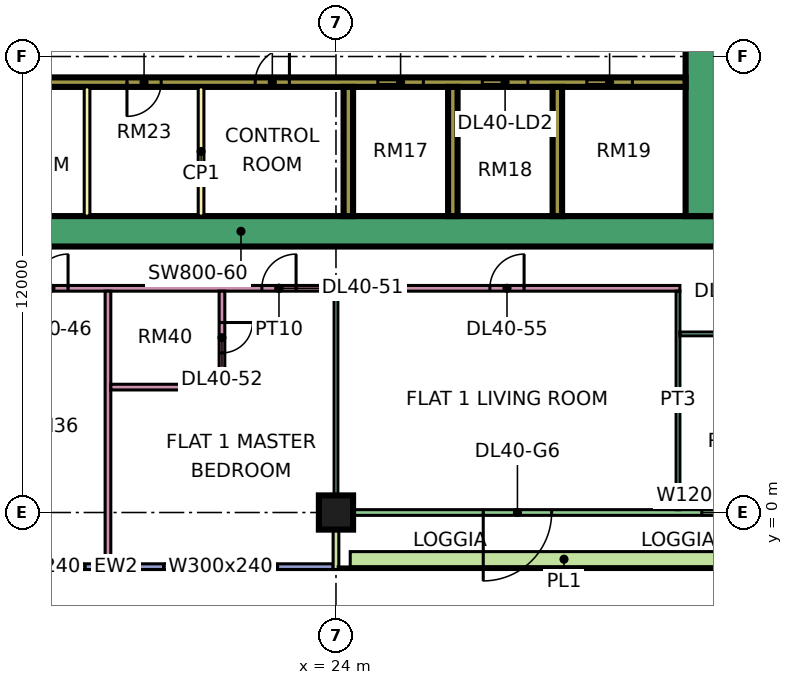
"""IFC4 building model, lengths in metres.
Left out: names, types, materials, properties, quantities, classifications, styles, units other than length and angle.
Written with IfcOpenShell. Run it as: python <this file> out.ifc"""

import sys

from ifc_helpers import new_model, si_unit, direction, frame, frame_2d, origin, origin_2d, place, context, subcontext, project, spatial, rectangle, extrude, element, fill, save


model = new_model("IFC4")
c1 = context("Model", 3, precision=1e-05, world=origin(), true_north=direction((0.0, 1.0)))
c2 = subcontext(c1, "Body", "Model", "MODEL_VIEW")
j1 = project(units=[si_unit("LENGTHUNIT", "METRE"), si_unit("PLANEANGLEUNIT", "RADIAN")], contexts=[c1])
p1 = place(None, origin())
s1 = spatial("IfcSite", under=j1, at=p1, CompositionType="ELEMENT")
p2 = place(p1, origin())
s2 = spatial("IfcBuilding", under=s1, at=p2, CompositionType="ELEMENT")
p3 = place(p2, frame((0.0, 0.0, 176.15)))
s3 = spatial("IfcBuildingStorey", under=s2, at=p3, CompositionType="ELEMENT", Elevation=176.15)
p4 = place(p3, frame((24.0, 0.0, 0.0), z_axis=(0.0, 0.0, 1.0), x_axis=(1.0, 0.0, 0.0)))
e1 = element("IfcColumn", 1, at=p4, inside=s3, PredefinedType="COLUMN", context=c2, shape_type="SweptSolid", body=[
    extrude(rectangle(XDim=0.9, YDim=0.9, at=origin_2d()), origin(), (0.0, 0.0, 1.0), 3.75),
])
p5 = place(p3, frame((9.0, 7.4, 0.0), z_axis=(0.0, 0.0, 1.0), x_axis=(1.0, 0.0, 0.0)))
e2 = element("IfcWall", 2, at=p5, inside=s3, PredefinedType="SHEAR", context=c2, shape_type="SweptSolid", body=[
    extrude(rectangle(XDim=25.0, YDim=0.8, at=frame_2d((12.5, 0.0))), origin(), (0.0, 0.0, 1.0), 3.75),
])
p6 = place(p3, frame((33.6, 7.8, 0.0), z_axis=(0.0, 0.0, 1.0), x_axis=(0.0, 1.0, 0.0)))
e3 = element("IfcWall", 3, at=p6, inside=s3, PredefinedType="SHEAR", context=c2, shape_type="SweptSolid", body=[
    extrude(rectangle(XDim=11.4, YDim=0.8, at=frame_2d((5.7, 0.0))), origin(), (0.0, 0.0, 1.0), 3.75),
])
p7 = place(p6, frame((5.4, 0.0, 0.0)))
e4 = element("IfcOpeningElement", 4, at=p7, cuts=e3, PredefinedType="OPENING", context=c2, shape_type="SweptSolid", body=[
    extrude(rectangle(XDim=1.8, YDim=2.4, at=frame_2d((0.9, 1.2))), frame((0.0, 0.41, 0.0), z_axis=(0.0, -1.0, 0.0), x_axis=(1.0, 0.0, 0.0)), (0.0, 0.0, 1.0), 0.82),
])
p8 = place(p3, frame((13.45, 11.325, 0.0), z_axis=(0.0, 0.0, 1.0), x_axis=(1.0, 0.0, 0.0)))
e5 = element("IfcWall", 5, at=p8, inside=s3, PredefinedType="SHEAR", context=c2, shape_type="SweptSolid", body=[
    extrude(rectangle(XDim=19.75, YDim=0.25, at=frame_2d((9.875, 0.0))), origin(), (0.0, 0.0, 1.0), 3.75),
])
p9 = place(p8, frame((11.65, 0.0, 0.0)))
e6 = element("IfcOpeningElement", 6, at=p9, cuts=e5, PredefinedType="OPENING", context=c2, shape_type="SweptSolid", body=[
    extrude(rectangle(XDim=1.2, YDim=2.2, at=frame_2d((0.6, 1.1))), frame((0.0, 0.135, 0.0), z_axis=(0.0, -1.0, 0.0), x_axis=(1.0, 0.0, 0.0)), (0.0, 0.0, 1.0), 0.27),
])
p10 = place(p8, frame((14.4, 0.0, 0.0)))
e7 = element("IfcOpeningElement", 7, at=p10, cuts=e5, PredefinedType="OPENING", context=c2, shape_type="SweptSolid", body=[
    extrude(rectangle(XDim=1.2, YDim=2.2, at=frame_2d((0.6, 1.1))), frame((0.0, 0.135, 0.0), z_axis=(0.0, -1.0, 0.0), x_axis=(1.0, 0.0, 0.0)), (0.0, 0.0, 1.0), 0.27),
])
p11 = place(p8, frame((17.15, 0.0, 0.0)))
e8 = element("IfcOpeningElement", 8, at=p11, cuts=e5, PredefinedType="OPENING", context=c2, shape_type="SweptSolid", body=[
    extrude(rectangle(XDim=1.2, YDim=2.2, at=frame_2d((0.6, 1.1))), frame((0.0, 0.135, 0.0), z_axis=(0.0, -1.0, 0.0), x_axis=(1.0, 0.0, 0.0)), (0.0, 0.0, 1.0), 0.27),
])
p12 = place(p8, frame((1.55, 0.0, 0.0)))
e9 = element("IfcOpeningElement", 9, at=p12, cuts=e5, PredefinedType="OPENING", context=c2, shape_type="SweptSolid", body=[
    extrude(rectangle(XDim=0.9, YDim=2.1, at=frame_2d((0.45, 1.05))), frame((0.0, 0.135, 0.0), z_axis=(0.0, -1.0, 0.0), x_axis=(1.0, 0.0, 0.0)), (0.0, 0.0, 1.0), 0.27),
])
p13 = place(p8, frame((5.05, 0.0, 0.0)))
e10 = element("IfcOpeningElement", 10, at=p13, cuts=e5, PredefinedType="OPENING", context=c2, shape_type="SweptSolid", body=[
    extrude(rectangle(XDim=0.9, YDim=2.1, at=frame_2d((0.45, 1.05))), frame((0.0, 0.135, 0.0), z_axis=(0.0, -1.0, 0.0), x_axis=(1.0, 0.0, 0.0)), (0.0, 0.0, 1.0), 0.27),
])
p14 = place(p8, frame((8.425, 0.0, 0.0)))
e11 = element("IfcOpeningElement", 11, at=p14, cuts=e5, PredefinedType="OPENING", context=c2, shape_type="SweptSolid", body=[
    extrude(rectangle(XDim=0.9, YDim=2.1, at=frame_2d((0.45, 1.05))), frame((0.0, 0.135, 0.0), z_axis=(0.0, -1.0, 0.0), x_axis=(1.0, 0.0, 0.0)), (0.0, 0.0, 1.0), 0.27),
])
for number, where, z_axis, x_axis in (
    (12, (24.325, 7.8, 0.0), (0.0, 0.0, 1.0), (0.0, 1.0, 0.0)),
    (13, (27.075, 7.8, 0.0), (0.0, 0.0, 1.0), (0.0, 1.0, 0.0)),
    (14, (29.825, 7.8, 0.0), (0.0, 0.0, 1.0), (0.0, 1.0, 0.0)),
):
    element("IfcWall", number, at=place(p3, frame(where, z_axis=z_axis, x_axis=x_axis)), inside=s3, PredefinedType="SHEAR", context=c2, shape_type="SweptSolid", body=[
        extrude(rectangle(XDim=3.4, YDim=0.25, at=frame_2d((1.7, 0.0))), origin(), (0.0, 0.0, 1.0), 3.75),
    ])
p15 = place(p3, frame((12.5, -1.425, 0.0), z_axis=(0.0, 0.0, 1.0), x_axis=(1.0, 0.0, 0.0)))
e15 = element("IfcWall", 15, at=p15, inside=s3, PredefinedType="SOLIDWALL", context=c2, shape_type="SweptSolid", body=[
    extrude(rectangle(XDim=11.425, YDim=0.15, at=frame_2d((5.712, 0.0))), origin(), (0.0, 0.0, 1.0), 3.35),
])
p16 = place(p15, frame((0.35, 0.0, 0.45)))
e16 = element("IfcOpeningElement", 16, at=p16, cuts=e15, PredefinedType="OPENING", context=c2, shape_type="SweptSolid", body=[
    extrude(rectangle(XDim=1.8, YDim=2.4, at=frame_2d((0.9, 1.2))), frame((0.0, 0.085, 0.0), z_axis=(0.0, -1.0, 0.0), x_axis=(1.0, 0.0, 0.0)), (0.0, 0.0, 1.0), 0.17),
])
p17 = place(p15, frame((3.1, 0.0, 0.45)))
e17 = element("IfcOpeningElement", 17, at=p17, cuts=e15, PredefinedType="OPENING", context=c2, shape_type="SweptSolid", body=[
    extrude(rectangle(XDim=1.8, YDim=2.4, at=frame_2d((0.9, 1.2))), frame((0.0, 0.085, 0.0), z_axis=(0.0, -1.0, 0.0), x_axis=(1.0, 0.0, 0.0)), (0.0, 0.0, 1.0), 0.17),
])
p18 = place(p15, frame((6.962, 0.0, 0.45)))
e18 = element("IfcOpeningElement", 18, at=p18, cuts=e15, PredefinedType="OPENING", context=c2, shape_type="SweptSolid", body=[
    extrude(rectangle(XDim=3.0, YDim=2.4, at=frame_2d((1.5, 1.2))), frame((0.0, 0.085, 0.0), z_axis=(0.0, -1.0, 0.0), x_axis=(1.0, 0.0, 0.0)), (0.0, 0.0, 1.0), 0.17),
])
p19 = place(p3, frame((24.075, 0.0, 0.0), z_axis=(0.0, 0.0, 1.0), x_axis=(1.0, 0.0, 0.0)))
e19 = element("IfcWall", 19, at=p19, inside=s3, PredefinedType="SOLIDWALL", context=c2, shape_type="SweptSolid", body=[
    extrude(rectangle(XDim=11.85, YDim=0.15, at=frame_2d((5.925, 0.0))), origin(), (0.0, 0.0, 1.0), 3.35),
])
p20 = place(p19, frame((3.8, 0.0, 0.0)))
e20 = element("IfcOpeningElement", 20, at=p20, cuts=e19, PredefinedType="OPENING", context=c2, shape_type="SweptSolid", body=[
    extrude(rectangle(XDim=1.8, YDim=2.4, at=frame_2d((0.9, 1.2))), frame((0.0, 0.085, 0.0), z_axis=(0.0, -1.0, 0.0), x_axis=(1.0, 0.0, 0.0)), (0.0, 0.0, 1.0), 0.17),
])
p21 = place(p19, frame((9.55, 0.0, 0.45)))
e21 = element("IfcOpeningElement", 21, at=p21, cuts=e19, PredefinedType="OPENING", context=c2, shape_type="SweptSolid", body=[
    extrude(rectangle(XDim=1.2, YDim=2.4, at=frame_2d((0.6, 1.2))), frame((0.0, 0.085, 0.0), z_axis=(0.0, -1.0, 0.0), x_axis=(1.0, 0.0, 0.0)), (0.0, 0.0, 1.0), 0.17),
])
p22 = place(p3, frame((24.0, -1.5, 0.0), z_axis=(0.0, 0.0, 1.0), x_axis=(0.0, 1.0, 0.0)))
e22 = element("IfcWall", 22, at=p22, inside=s3, PredefinedType="SOLIDWALL", context=c2, shape_type="SweptSolid", body=[
    extrude(rectangle(XDim=1.5, YDim=0.15, at=frame_2d((0.75, 0.0))), origin(), (0.0, 0.0, 1.0), 3.35),
])
p23 = place(p3, frame((24.375, -1.229, 0.0), z_axis=(0.0, 0.0, 1.0), x_axis=(1.0, 0.0, 0.0)))
e23 = element("IfcWall", 23, at=p23, inside=s3, PredefinedType="SOLIDWALL", context=c2, shape_type="SweptSolid", body=[
    extrude(rectangle(XDim=11.25, YDim=0.4, at=frame_2d((5.625, 0.0))), origin(), (0.0, 0.0, 1.0), 0.7),
])
for number, where, z_axis, x_axis in (
    (24, (17.45, 7.8, 0.0), (0.0, 0.0, 1.0), (0.0, 1.0, 0.0)),
    (25, (20.45, 7.8, 0.0), (0.0, 0.0, 1.0), (0.0, 1.0, 0.0)),
):
    element("IfcWall", number, at=place(p3, frame(where, z_axis=z_axis, x_axis=x_axis)), inside=s3, PredefinedType="PARTITIONING", context=c2, shape_type="SweptSolid", body=[
        extrude(rectangle(XDim=3.4, YDim=0.15, at=frame_2d((1.7, 0.0))), origin(), (0.0, 0.0, 1.0), 3.35),
    ])
p24 = place(p3, frame((11.95, 5.9, 0.0), z_axis=(0.0, 0.0, 1.0), x_axis=(1.0, 0.0, 0.0)))
e26 = element("IfcWall", 26, at=p24, inside=s3, PredefinedType="PARTITIONING", context=c2, shape_type="SweptSolid", body=[
    extrude(rectangle(XDim=21.1, YDim=0.15, at=frame_2d((10.55, 0.0))), origin(), (0.0, 0.0, 1.0), 3.35),
])
p25 = place(p24, frame((1.1, 0.0, 0.0)))
e27 = element("IfcOpeningElement", 27, at=p25, cuts=e26, PredefinedType="OPENING", context=c2, shape_type="SweptSolid", body=[
    extrude(rectangle(XDim=0.9, YDim=2.1, at=frame_2d((0.45, 1.05))), frame((0.0, 0.085, 0.0), z_axis=(0.0, -1.0, 0.0), x_axis=(1.0, 0.0, 0.0)), (0.0, 0.0, 1.0), 0.17),
])
p26 = place(p24, frame((4.1, 0.0, 0.0)))
e28 = element("IfcOpeningElement", 28, at=p26, cuts=e26, PredefinedType="OPENING", context=c2, shape_type="SweptSolid", body=[
    extrude(rectangle(XDim=0.9, YDim=2.1, at=frame_2d((0.45, 1.05))), frame((0.0, 0.085, 0.0), z_axis=(0.0, -1.0, 0.0), x_axis=(1.0, 0.0, 0.0)), (0.0, 0.0, 1.0), 0.17),
])
p27 = place(p24, frame((10.1, 0.0, 0.0)))
e29 = element("IfcOpeningElement", 29, at=p27, cuts=e26, PredefinedType="OPENING", context=c2, shape_type="SweptSolid", body=[
    extrude(rectangle(XDim=0.9, YDim=2.1, at=frame_2d((0.45, 1.05))), frame((0.0, 0.085, 0.0), z_axis=(0.0, -1.0, 0.0), x_axis=(1.0, 0.0, 0.0)), (0.0, 0.0, 1.0), 0.17),
])
p28 = place(p24, frame((16.1, 0.0, 0.0)))
e30 = element("IfcOpeningElement", 30, at=p28, cuts=e26, PredefinedType="OPENING", context=c2, shape_type="SweptSolid", body=[
    extrude(rectangle(XDim=0.9, YDim=2.1, at=frame_2d((0.45, 1.05))), frame((0.0, 0.085, 0.0), z_axis=(0.0, -1.0, 0.0), x_axis=(1.0, 0.0, 0.0)), (0.0, 0.0, 1.0), 0.17),
])
p29 = place(p3, frame((18.0, -1.351, 0.0), z_axis=(0.0, 0.0, 1.0), x_axis=(0.0, 1.0, 0.0)))
e31 = element("IfcWall", 31, at=p29, inside=s3, PredefinedType="PARTITIONING", context=c2, shape_type="SweptSolid", body=[
    extrude(rectangle(XDim=7.176, YDim=0.15, at=frame_2d((3.588, 0.0))), origin(), (0.0, 0.0, 1.0), 3.35),
])
p30 = place(p3, frame((18.075, 3.3, 0.0), z_axis=(0.0, 0.0, 1.0), x_axis=(1.0, 0.0, 0.0)))
e32 = element("IfcWall", 32, at=p30, inside=s3, PredefinedType="PARTITIONING", context=c2, shape_type="SweptSolid", body=[
    extrude(rectangle(XDim=3.0, YDim=0.15, at=frame_2d((1.5, 0.0))), origin(), (0.0, 0.0, 1.0), 3.35),
])
p31 = place(p3, frame((21.0, 3.375, 0.0), z_axis=(0.0, 0.0, 1.0), x_axis=(0.0, 1.0, 0.0)))
e33 = element("IfcWall", 33, at=p31, inside=s3, PredefinedType="PARTITIONING", context=c2, shape_type="SweptSolid", body=[
    extrude(rectangle(XDim=2.45, YDim=0.15, at=frame_2d((1.225, 0.0))), origin(), (0.0, 0.0, 1.0), 3.35),
])
p32 = place(p31, frame((0.825, 0.0, 0.0)))
e34 = element("IfcOpeningElement", 34, at=p32, cuts=e33, PredefinedType="OPENING", context=c2, shape_type="SweptSolid", body=[
    extrude(rectangle(XDim=0.8, YDim=2.1, at=frame_2d((0.4, 1.05))), frame((0.0, 0.085, 0.0), z_axis=(0.0, -1.0, 0.0), x_axis=(1.0, 0.0, 0.0)), (0.0, 0.0, 1.0), 0.17),
])
p33 = place(p3, frame((24.0, 0.0, 0.0), z_axis=(0.0, 0.0, 1.0), x_axis=(0.0, 1.0, 0.0)))
e35 = element("IfcWall", 35, at=p33, inside=s3, PredefinedType="PARTITIONING", context=c2, shape_type="SweptSolid", body=[
    extrude(rectangle(XDim=5.825, YDim=0.1, at=frame_2d((2.913, 0.0))), origin(), (0.0, 0.0, 1.0), 3.35),
])
p34 = place(p3, frame((33.0, 0.074, 0.0), z_axis=(0.0, 0.0, 1.0), x_axis=(0.0, 1.0, 0.0)))
e36 = element("IfcWall", 36, at=p34, inside=s3, PredefinedType="PARTITIONING", context=c2, shape_type="SweptSolid", body=[
    extrude(rectangle(XDim=5.751, YDim=0.1, at=frame_2d((2.875, 0.0))), origin(), (0.0, 0.0, 1.0), 3.35),
])
p35 = place(p3, frame((33.05, 4.7, 0.0), z_axis=(0.0, 0.0, 1.0), x_axis=(1.0, 0.0, 0.0)))
e37 = element("IfcWall", 37, at=p35, inside=s3, PredefinedType="PARTITIONING", context=c2, shape_type="SweptSolid", body=[
    extrude(rectangle(XDim=14.85, YDim=0.1, at=frame_2d((7.425, 0.0))), origin(), (0.0, 0.0, 1.0), 3.35),
])
p36 = place(p35, frame((1.0, 0.0, 0.0)))
e38 = element("IfcOpeningElement", 38, at=p36, cuts=e37, PredefinedType="OPENING", context=c2, shape_type="SweptSolid", body=[
    extrude(rectangle(XDim=0.9, YDim=2.1, at=frame_2d((0.45, 1.05))), frame((0.0, 0.06, 0.0), z_axis=(0.0, -1.0, 0.0), x_axis=(1.0, 0.0, 0.0)), (0.0, 0.0, 1.0), 0.12),
])
p37 = place(p35, frame((4.0, 0.0, 0.0)))
e39 = element("IfcOpeningElement", 39, at=p37, cuts=e37, PredefinedType="OPENING", context=c2, shape_type="SweptSolid", body=[
    extrude(rectangle(XDim=0.9, YDim=2.1, at=frame_2d((0.45, 1.05))), frame((0.0, 0.06, 0.0), z_axis=(0.0, -1.0, 0.0), x_axis=(1.0, 0.0, 0.0)), (0.0, 0.0, 1.0), 0.12),
])
p38 = place(p35, frame((10.0, 0.0, 0.0)))
e40 = element("IfcOpeningElement", 40, at=p38, cuts=e37, PredefinedType="OPENING", context=c2, shape_type="SweptSolid", body=[
    extrude(rectangle(XDim=0.9, YDim=2.1, at=frame_2d((0.45, 1.05))), frame((0.0, 0.06, 0.0), z_axis=(0.0, -1.0, 0.0), x_axis=(1.0, 0.0, 0.0)), (0.0, 0.0, 1.0), 0.12),
])
p39 = place(p17, origin())
e41 = element("IfcWindow", 41, at=p39, inside=s3, PartitioningType="SINGLE_PANEL", PredefinedType="WINDOW", context=c2, shape_type="SweptSolid", body=[
    extrude(rectangle(XDim=1.8, YDim=2.4, at=frame_2d((0.9, 1.2))), frame((0.0, 0.03, 0.0), z_axis=(0.0, -1.0, 0.0), x_axis=(1.0, 0.0, 0.0)), (0.0, 0.0, 1.0), 0.06),
])
fill(e17, e41)
p40 = place(p18, origin())
e42 = element("IfcWindow", 42, at=p40, inside=s3, PartitioningType="SINGLE_PANEL", PredefinedType="WINDOW", context=c2, shape_type="SweptSolid", body=[
    extrude(rectangle(XDim=3.0, YDim=2.4, at=frame_2d((1.5, 1.2))), frame((0.0, 0.03, 0.0), z_axis=(0.0, -1.0, 0.0), x_axis=(1.0, 0.0, 0.0)), (0.0, 0.0, 1.0), 0.06),
])
fill(e18, e42)
p41 = place(p20, frame((1.8, 0.0, 0.0), z_axis=(0.0, 0.0, 1.0), x_axis=(-1.0, 0.0, 0.0)))
e43 = element("IfcDoor", 43, at=p41, inside=s3, OperationType="DOUBLE_DOOR_SINGLE_SWING", PredefinedType="DOOR", context=c2, shape_type="SweptSolid", body=[
    extrude(rectangle(XDim=1.8, YDim=2.4, at=frame_2d((0.9, 1.2))), frame((0.0, 0.025, 0.0), z_axis=(0.0, -1.0, 0.0), x_axis=(1.0, 0.0, 0.0)), (0.0, 0.0, 1.0), 0.05),
])
fill(e20, e43)
p42 = place(p21, origin())
e44 = element("IfcWindow", 44, at=p42, inside=s3, PartitioningType="SINGLE_PANEL", PredefinedType="WINDOW", context=c2, shape_type="SweptSolid", body=[
    extrude(rectangle(XDim=1.2, YDim=2.4, at=frame_2d((0.6, 1.2))), frame((0.0, 0.03, 0.0), z_axis=(0.0, -1.0, 0.0), x_axis=(1.0, 0.0, 0.0)), (0.0, 0.0, 1.0), 0.06),
])
fill(e21, e44)
p43 = place(p9, origin())
e45 = element("IfcDoor", 45, at=p43, inside=s3, OperationType="DOUBLE_DOOR_SLIDING", PredefinedType="DOOR", context=c2, shape_type="SweptSolid", body=[
    extrude(rectangle(XDim=1.2, YDim=2.2, at=frame_2d((0.6, 1.1))), frame((0.0, 0.025, 0.0), z_axis=(0.0, -1.0, 0.0), x_axis=(1.0, 0.0, 0.0)), (0.0, 0.0, 1.0), 0.05),
])
fill(e6, e45)
p44 = place(p10, origin())
e46 = element("IfcDoor", 46, at=p44, inside=s3, OperationType="DOUBLE_DOOR_SLIDING", PredefinedType="DOOR", context=c2, shape_type="SweptSolid", body=[
    extrude(rectangle(XDim=1.2, YDim=2.2, at=frame_2d((0.6, 1.1))), frame((0.0, 0.025, 0.0), z_axis=(0.0, -1.0, 0.0), x_axis=(1.0, 0.0, 0.0)), (0.0, 0.0, 1.0), 0.05),
])
fill(e7, e46)
p45 = place(p11, origin())
e47 = element("IfcDoor", 47, at=p45, inside=s3, OperationType="DOUBLE_DOOR_SLIDING", PredefinedType="DOOR", context=c2, shape_type="SweptSolid", body=[
    extrude(rectangle(XDim=1.2, YDim=2.2, at=frame_2d((0.6, 1.1))), frame((0.0, 0.025, 0.0), z_axis=(0.0, -1.0, 0.0), x_axis=(1.0, 0.0, 0.0)), (0.0, 0.0, 1.0), 0.05),
])
fill(e8, e47)
p46 = place(p13, frame((0.9, 0.0, 0.0), z_axis=(0.0, 0.0, 1.0), x_axis=(-1.0, 0.0, 0.0)))
e48 = element("IfcDoor", 48, at=p46, inside=s3, OperationType="SINGLE_SWING_LEFT", PredefinedType="DOOR", context=c2, shape_type="SweptSolid", body=[
    extrude(rectangle(XDim=0.9, YDim=2.1, at=frame_2d((0.45, 1.05))), frame((0.0, 0.025, 0.0), z_axis=(0.0, -1.0, 0.0), x_axis=(1.0, 0.0, 0.0)), (0.0, 0.0, 1.0), 0.05),
])
fill(e10, e48)
p47 = place(p14, frame((0.9, 0.0, 0.0), z_axis=(0.0, 0.0, 1.0), x_axis=(-1.0, 0.0, 0.0)))
e49 = element("IfcDoor", 49, at=p47, inside=s3, OperationType="SINGLE_SWING_RIGHT", PredefinedType="DOOR", context=c2, shape_type="SweptSolid", body=[
    extrude(rectangle(XDim=0.9, YDim=2.1, at=frame_2d((0.45, 1.05))), frame((0.0, 0.025, 0.0), z_axis=(0.0, -1.0, 0.0), x_axis=(1.0, 0.0, 0.0)), (0.0, 0.0, 1.0), 0.05),
])
fill(e11, e49)
p48 = place(p26, frame((0.9, 0.0, 0.0), z_axis=(0.0, 0.0, 1.0), x_axis=(-1.0, 0.0, 0.0)))
e50 = element("IfcDoor", 50, at=p48, inside=s3, OperationType="SINGLE_SWING_RIGHT", PredefinedType="DOOR", context=c2, shape_type="SweptSolid", body=[
    extrude(rectangle(XDim=0.9, YDim=2.1, at=frame_2d((0.45, 1.05))), frame((0.0, 0.025, 0.0), z_axis=(0.0, -1.0, 0.0), x_axis=(1.0, 0.0, 0.0)), (0.0, 0.0, 1.0), 0.05),
])
fill(e28, e50)
p49 = place(p27, frame((0.9, 0.0, 0.0), z_axis=(0.0, 0.0, 1.0), x_axis=(-1.0, 0.0, 0.0)))
e51 = element("IfcDoor", 51, at=p49, inside=s3, OperationType="SINGLE_SWING_RIGHT", PredefinedType="DOOR", context=c2, shape_type="SweptSolid", body=[
    extrude(rectangle(XDim=0.9, YDim=2.1, at=frame_2d((0.45, 1.05))), frame((0.0, 0.025, 0.0), z_axis=(0.0, -1.0, 0.0), x_axis=(1.0, 0.0, 0.0)), (0.0, 0.0, 1.0), 0.05),
])
fill(e29, e51)
p50 = place(p32, origin())
e52 = element("IfcDoor", 52, at=p50, inside=s3, OperationType="SINGLE_SWING_RIGHT", PredefinedType="DOOR", context=c2, shape_type="SweptSolid", body=[
    extrude(rectangle(XDim=0.8, YDim=2.1, at=frame_2d((0.4, 1.05))), frame((0.0, 0.025, 0.0), z_axis=(0.0, -1.0, 0.0), x_axis=(1.0, 0.0, 0.0)), (0.0, 0.0, 1.0), 0.05),
])
fill(e34, e52)
p51 = place(p28, frame((0.9, 0.0, 0.0), z_axis=(0.0, 0.0, 1.0), x_axis=(-1.0, 0.0, 0.0)))
e53 = element("IfcDoor", 53, at=p51, inside=s3, OperationType="SINGLE_SWING_RIGHT", PredefinedType="DOOR", context=c2, shape_type="SweptSolid", body=[
    extrude(rectangle(XDim=0.9, YDim=2.1, at=frame_2d((0.45, 1.05))), frame((0.0, 0.025, 0.0), z_axis=(0.0, -1.0, 0.0), x_axis=(1.0, 0.0, 0.0)), (0.0, 0.0, 1.0), 0.05),
])
fill(e30, e53)
save(model, sys.argv[1])
